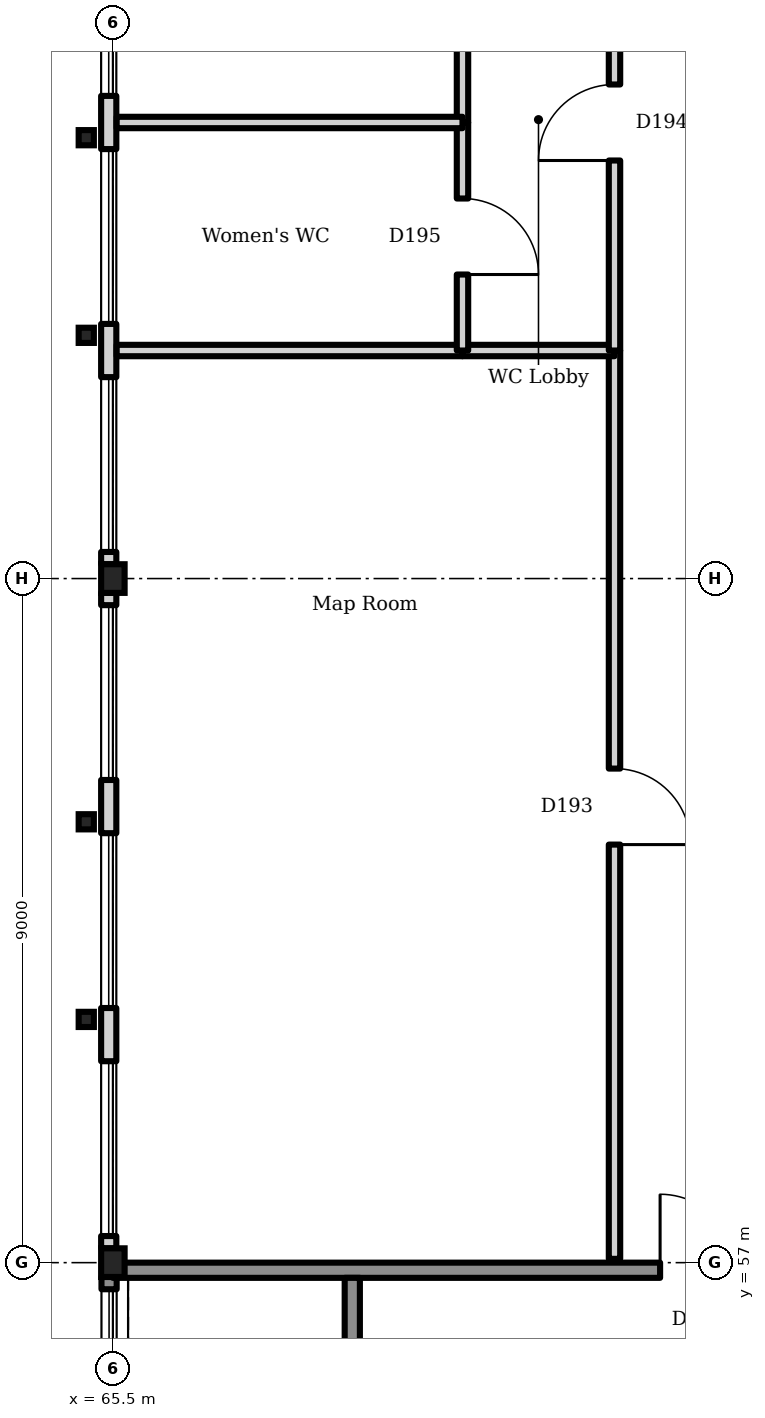
"""IFC4 building model, lengths in metres.
Left out: names, types, materials, properties, quantities, classifications, styles, units other than length and angle.
Written with IfcOpenShell. Run it as: python <this file> out.ifc"""

import sys

from ifc_helpers import new_model, si_unit, direction, frame, frame_2d, origin, origin_2d, place, context, subcontext, project, spatial, rectangle, hollow_rectangle, i_section, extrude, element, fill, save


model = new_model("IFC4")
c1 = context("Model", 3, precision=1e-05, world=origin(), true_north=direction((0.0, 1.0)))
c2 = subcontext(c1, "Body", "Model", "MODEL_VIEW")
j1 = project(units=[si_unit("LENGTHUNIT", "METRE"), si_unit("PLANEANGLEUNIT", "RADIAN")], contexts=[c1])
p1 = place(None, origin())
s1 = spatial("IfcSite", under=j1, at=p1, CompositionType="ELEMENT")
p2 = place(p1, origin())
s2 = spatial("IfcBuilding", under=s1, at=p2, CompositionType="ELEMENT")
p3 = place(p2, frame((0.0, 0.0, 5.4)))
s3 = spatial("IfcBuildingStorey", under=s2, at=p3, CompositionType="ELEMENT", Elevation=5.4)
for number, where, z_axis, x_axis in (
    (1, (65.5, 57.0, 0.0), (0.0, 0.0, 1.0), (1.0, 0.0, 0.0)),
    (2, (65.5, 66.0, 0.0), (0.0, 0.0, 1.0), (1.0, 0.0, 0.0)),
):
    element("IfcColumn", number, at=place(p3, frame(where, z_axis=z_axis, x_axis=x_axis)), inside=s3, PredefinedType="COLUMN", context=c2, shape_type="SweptSolid", body=[
        extrude(i_section(OverallWidth=0.309, OverallDepth=0.377, WebThickness=0.021, FlangeThickness=0.04, FilletRadius=0.027, at=origin_2d()), origin(), (0.0, 0.0, 1.0), 4.5),
    ])
p4 = place(p3, frame((65.45, 48.32, 0.0), z_axis=(0.0, 0.0, 1.0), x_axis=(0.0, 1.0, 0.0)))
e3 = element("IfcWall", 3, at=p4, inside=s3, PredefinedType="SOLIDWALL", context=c2, shape_type="SweptSolid", body=[
    extrude(rectangle(XDim=8.491, YDim=0.2, at=frame_2d((4.246, 0.0))), origin(), (0.0, 0.0, 1.0), 4.25),
])
p5 = place(p4, frame((3.03, 0.0, 0.9)))
e4 = element("IfcOpeningElement", 4, at=p5, cuts=e3, PredefinedType="OPENING", context=c2, shape_type="SweptSolid", body=[
    extrude(rectangle(XDim=2.3, YDim=2.7, at=frame_2d((1.15, 1.35))), frame((0.0, 0.11, 0.0), z_axis=(0.0, -1.0, 0.0), x_axis=(1.0, 0.0, 0.0)), (0.0, 0.0, 1.0), 0.22),
])
p6 = place(p4, frame((6.03, 0.0, 0.9)))
e5 = element("IfcOpeningElement", 5, at=p6, cuts=e3, PredefinedType="OPENING", context=c2, shape_type="SweptSolid", body=[
    extrude(rectangle(XDim=2.3, YDim=2.7, at=frame_2d((1.15, 1.35))), frame((0.0, 0.11, 0.0), z_axis=(0.0, -1.0, 0.0), x_axis=(1.0, 0.0, 0.0)), (0.0, 0.0, 1.0), 0.22),
])
p7 = place(p3, frame((65.446, 57.188, 0.0), z_axis=(0.0, 0.0, 1.0), x_axis=(0.0, 1.0, 0.0)))
e6 = element("IfcWall", 6, at=p7, inside=s3, PredefinedType="SOLIDWALL", context=c2, shape_type="SweptSolid", body=[
    extrude(rectangle(XDim=8.623, YDim=0.2, at=frame_2d((4.312, 0.0))), origin(), (0.0, 0.0, 1.0), 3.75),
])
p8 = place(p7, frame((0.162, 0.0, 0.9)))
e7 = element("IfcOpeningElement", 7, at=p8, cuts=e6, PredefinedType="OPENING", context=c2, shape_type="SweptSolid", body=[
    extrude(rectangle(XDim=2.3, YDim=2.7, at=frame_2d((1.15, 1.35))), frame((0.0, 0.11, 0.0), z_axis=(0.0, -1.0, 0.0), x_axis=(1.0, 0.0, 0.0)), (0.0, 0.0, 1.0), 0.22),
])
p9 = place(p7, frame((3.162, 0.0, 0.9)))
e8 = element("IfcOpeningElement", 8, at=p9, cuts=e6, PredefinedType="OPENING", context=c2, shape_type="SweptSolid", body=[
    extrude(rectangle(XDim=2.3, YDim=2.7, at=frame_2d((1.15, 1.35))), frame((0.0, 0.11, 0.0), z_axis=(0.0, -1.0, 0.0), x_axis=(1.0, 0.0, 0.0)), (0.0, 0.0, 1.0), 0.22),
])
p10 = place(p7, frame((6.162, 0.0, 0.9)))
e9 = element("IfcOpeningElement", 9, at=p10, cuts=e6, PredefinedType="OPENING", context=c2, shape_type="SweptSolid", body=[
    extrude(rectangle(XDim=2.3, YDim=2.7, at=frame_2d((1.15, 1.35))), frame((0.0, 0.11, 0.0), z_axis=(0.0, -1.0, 0.0), x_axis=(1.0, 0.0, 0.0)), (0.0, 0.0, 1.0), 0.22),
])
p11 = place(p3, frame((65.446, 66.188, 0.0), z_axis=(0.0, 0.0, 1.0), x_axis=(0.0, 1.0, 0.0)))
e10 = element("IfcWall", 10, at=p11, inside=s3, PredefinedType="SOLIDWALL", context=c2, shape_type="SweptSolid", body=[
    extrude(rectangle(XDim=8.595, YDim=0.2, at=frame_2d((4.298, 0.0))), origin(), (0.0, 0.0, 1.0), 3.75),
])
p12 = place(p11, frame((0.162, 0.0, 0.9)))
e11 = element("IfcOpeningElement", 11, at=p12, cuts=e10, PredefinedType="OPENING", context=c2, shape_type="SweptSolid", body=[
    extrude(rectangle(XDim=2.3, YDim=2.7, at=frame_2d((1.15, 1.35))), frame((0.0, 0.11, 0.0), z_axis=(0.0, -1.0, 0.0), x_axis=(1.0, 0.0, 0.0)), (0.0, 0.0, 1.0), 0.22),
])
p13 = place(p11, frame((3.162, 0.0, 0.9)))
e12 = element("IfcOpeningElement", 12, at=p13, cuts=e10, PredefinedType="OPENING", context=c2, shape_type="SweptSolid", body=[
    extrude(rectangle(XDim=2.3, YDim=2.7, at=frame_2d((1.15, 1.35))), frame((0.0, 0.11, 0.0), z_axis=(0.0, -1.0, 0.0), x_axis=(1.0, 0.0, 0.0)), (0.0, 0.0, 1.0), 0.22),
])
p14 = place(p11, frame((6.162, 0.0, 0.9)))
e13 = element("IfcOpeningElement", 13, at=p14, cuts=e10, PredefinedType="OPENING", context=c2, shape_type="SweptSolid", body=[
    extrude(rectangle(XDim=2.3, YDim=2.7, at=frame_2d((1.15, 1.35))), frame((0.0, 0.11, 0.0), z_axis=(0.0, -1.0, 0.0), x_axis=(1.0, 0.0, 0.0)), (0.0, 0.0, 1.0), 0.22),
])
p15 = place(p3, frame((65.5, 56.9, 0.0), z_axis=(0.0, 0.0, 1.0), x_axis=(1.0, 0.0, 0.0)))
e14 = element("IfcWall", 14, at=p15, inside=s3, PredefinedType="SHEAR", context=c2, shape_type="SweptSolid", body=[
    extrude(rectangle(XDim=9.0, YDim=0.2, at=frame_2d((4.5, 0.0))), origin(), (0.0, 0.0, 1.0), 4.25),
])
p16 = place(p15, frame((7.2, 0.0, 0.0)))
e15 = element("IfcOpeningElement", 15, at=p16, cuts=e14, PredefinedType="OPENING", context=c2, shape_type="SweptSolid", body=[
    extrude(rectangle(XDim=1.0, YDim=2.1, at=frame_2d((0.5, 1.05))), frame((0.0, 0.11, 0.0), z_axis=(0.0, -1.0, 0.0), x_axis=(1.0, 0.0, 0.0)), (0.0, 0.0, 1.0), 0.22),
])
p17 = place(p3, frame((68.65, 48.15, 0.0), z_axis=(0.0, 0.0, 1.0), x_axis=(0.0, 1.0, 0.0)))
e16 = element("IfcWall", 16, at=p17, inside=s3, PredefinedType="SHEAR", context=c2, shape_type="SweptSolid", body=[
    extrude(rectangle(XDim=8.65, YDim=0.2, at=frame_2d((4.325, 0.0))), origin(), (0.0, 0.0, 1.0), 4.25),
])
p18 = place(p17, frame((0.35, 0.0, 0.0)))
e17 = element("IfcOpeningElement", 17, at=p18, cuts=e16, PredefinedType="OPENING", context=c2, shape_type="SweptSolid", body=[
    extrude(rectangle(XDim=1.0, YDim=2.1, at=frame_2d((0.5, 1.05))), frame((0.0, 0.11, 0.0), z_axis=(0.0, -1.0, 0.0), x_axis=(1.0, 0.0, 0.0)), (0.0, 0.0, 1.0), 0.22),
])
p19 = place(p3, frame((72.1, 57.05, 0.0), z_axis=(0.0, 0.0, 1.0), x_axis=(0.0, 1.0, 0.0)))
e18 = element("IfcWall", 18, at=p19, inside=s3, PredefinedType="PARTITIONING", context=c2, shape_type="SweptSolid", body=[
    extrude(rectangle(XDim=11.95, YDim=0.15, at=frame_2d((5.975, 0.0))), origin(), (0.0, 0.0, 1.0), 3.7),
])
p20 = place(p19, frame((5.45, 0.0, 0.0)))
e19 = element("IfcOpeningElement", 19, at=p20, cuts=e18, PredefinedType="OPENING", context=c2, shape_type="SweptSolid", body=[
    extrude(rectangle(XDim=1.0, YDim=2.1, at=frame_2d((0.5, 1.05))), frame((0.0, 0.085, 0.0), z_axis=(0.0, -1.0, 0.0), x_axis=(1.0, 0.0, 0.0)), (0.0, 0.0, 1.0), 0.17),
])
p21 = place(p3, frame((70.1, 69.0, 0.0), z_axis=(0.0, 0.0, 1.0), x_axis=(1.0, 0.0, 0.0)))
e20 = element("IfcWall", 20, at=p21, inside=s3, PredefinedType="PARTITIONING", context=c2, shape_type="SweptSolid", body=[
    extrude(rectangle(XDim=2.0, YDim=0.15, at=frame_2d((1.0, 0.0))), origin(), (0.0, 0.0, 1.0), 3.7),
])
p22 = place(p3, frame((65.55, 69.0, 0.0), z_axis=(0.0, 0.0, 1.0), x_axis=(1.0, 0.0, 0.0)))
e21 = element("IfcWall", 21, at=p22, inside=s3, PredefinedType="PARTITIONING", context=c2, shape_type="SweptSolid", body=[
    extrude(rectangle(XDim=4.55, YDim=0.15, at=frame_2d((2.275, 0.0))), origin(), (0.0, 0.0, 1.0), 3.7),
])
p23 = place(p3, frame((72.1, 69.0, 0.0), z_axis=(0.0, 0.0, 1.0), x_axis=(0.0, 1.0, 0.0)))
e22 = element("IfcWall", 22, at=p23, inside=s3, PredefinedType="PARTITIONING", context=c2, shape_type="SweptSolid", body=[
    extrude(rectangle(XDim=5.95, YDim=0.15, at=frame_2d((2.975, 0.0))), origin(), (0.0, 0.0, 1.0), 3.7),
])
p24 = place(p23, frame((2.5, 0.0, 0.0)))
e23 = element("IfcOpeningElement", 23, at=p24, cuts=e22, PredefinedType="OPENING", context=c2, shape_type="SweptSolid", body=[
    extrude(rectangle(XDim=1.0, YDim=2.1, at=frame_2d((0.5, 1.05))), frame((0.0, 0.085, 0.0), z_axis=(0.0, -1.0, 0.0), x_axis=(1.0, 0.0, 0.0)), (0.0, 0.0, 1.0), 0.17),
])
p25 = place(p3, frame((70.1, 72.0, 0.0), z_axis=(0.0, 0.0, 1.0), x_axis=(0.0, 1.0, 0.0)))
e24 = element("IfcWall", 24, at=p25, inside=s3, PredefinedType="PARTITIONING", context=c2, shape_type="SweptSolid", body=[
    extrude(rectangle(XDim=2.95, YDim=0.15, at=frame_2d((1.475, 0.0))), origin(), (0.0, 0.0, 1.0), 3.7),
])
p26 = place(p25, frame((1.0, 0.0, 0.0)))
e25 = element("IfcOpeningElement", 25, at=p26, cuts=e24, PredefinedType="OPENING", context=c2, shape_type="SweptSolid", body=[
    extrude(rectangle(XDim=1.0, YDim=2.1, at=frame_2d((0.5, 1.05))), frame((0.0, 0.085, 0.0), z_axis=(0.0, -1.0, 0.0), x_axis=(1.0, 0.0, 0.0)), (0.0, 0.0, 1.0), 0.17),
])
p27 = place(p3, frame((70.1, 69.0, 0.0), z_axis=(0.0, 0.0, 1.0), x_axis=(0.0, 1.0, 0.0)))
e26 = element("IfcWall", 26, at=p27, inside=s3, PredefinedType="PARTITIONING", context=c2, shape_type="SweptSolid", body=[
    extrude(rectangle(XDim=3.0, YDim=0.15, at=frame_2d((1.5, 0.0))), origin(), (0.0, 0.0, 1.0), 3.7),
])
p28 = place(p27, frame((1.0, 0.0, 0.0)))
e27 = element("IfcOpeningElement", 27, at=p28, cuts=e26, PredefinedType="OPENING", context=c2, shape_type="SweptSolid", body=[
    extrude(rectangle(XDim=1.0, YDim=2.1, at=frame_2d((0.5, 1.05))), frame((0.0, 0.085, 0.0), z_axis=(0.0, -1.0, 0.0), x_axis=(1.0, 0.0, 0.0)), (0.0, 0.0, 1.0), 0.17),
])
p29 = place(p3, frame((65.55, 72.0, 0.0), z_axis=(0.0, 0.0, 1.0), x_axis=(1.0, 0.0, 0.0)))
e28 = element("IfcWall", 28, at=p29, inside=s3, PredefinedType="PARTITIONING", context=c2, shape_type="SweptSolid", body=[
    extrude(rectangle(XDim=4.55, YDim=0.15, at=frame_2d((2.275, 0.0))), origin(), (0.0, 0.0, 1.0), 3.7),
])
for number, where, z_axis, x_axis in (
    (29, (65.15, 60.2, 0.0), (0.0, 0.0, 1.0), (1.0, 0.0, 0.0)),
    (30, (65.15, 62.8, 0.0), (0.0, 0.0, 1.0), (1.0, 0.0, 0.0)),
    (31, (65.15, 69.2, 0.0), (0.0, 0.0, 1.0), (1.0, 0.0, 0.0)),
    (32, (65.15, 71.8, 0.0), (0.0, 0.0, 1.0), (1.0, 0.0, 0.0)),
):
    element("IfcColumn", number, at=place(p3, frame(where, z_axis=z_axis, x_axis=x_axis)), inside=s3, PredefinedType="COLUMN", context=c2, shape_type="SweptSolid", body=[
        extrude(hollow_rectangle(XDim=0.2, YDim=0.2, WallThickness=0.01, InnerFilletRadius=0.01, OuterFilletRadius=0.015, at=origin_2d()), origin(), (0.0, 0.0, 1.0), 4.5),
    ])
p30 = place(p6, origin())
e33 = element("IfcWindow", 33, at=p30, inside=s3, PartitioningType="SINGLE_PANEL", PredefinedType="WINDOW", context=c2, shape_type="SweptSolid", body=[
    extrude(rectangle(XDim=2.3, YDim=2.7, at=frame_2d((1.15, 1.35))), frame((0.0, 0.03, 0.0), z_axis=(0.0, -1.0, 0.0), x_axis=(1.0, 0.0, 0.0)), (0.0, 0.0, 1.0), 0.06),
])
fill(e5, e33)
p31 = place(p8, origin())
e34 = element("IfcWindow", 34, at=p31, inside=s3, PartitioningType="SINGLE_PANEL", PredefinedType="WINDOW", context=c2, shape_type="SweptSolid", body=[
    extrude(rectangle(XDim=2.3, YDim=2.7, at=frame_2d((1.15, 1.35))), frame((0.0, 0.03, 0.0), z_axis=(0.0, -1.0, 0.0), x_axis=(1.0, 0.0, 0.0)), (0.0, 0.0, 1.0), 0.06),
])
fill(e7, e34)
p32 = place(p9, origin())
e35 = element("IfcWindow", 35, at=p32, inside=s3, PartitioningType="SINGLE_PANEL", PredefinedType="WINDOW", context=c2, shape_type="SweptSolid", body=[
    extrude(rectangle(XDim=2.3, YDim=2.7, at=frame_2d((1.15, 1.35))), frame((0.0, 0.03, 0.0), z_axis=(0.0, -1.0, 0.0), x_axis=(1.0, 0.0, 0.0)), (0.0, 0.0, 1.0), 0.06),
])
fill(e8, e35)
p33 = place(p10, origin())
e36 = element("IfcWindow", 36, at=p33, inside=s3, PartitioningType="SINGLE_PANEL", PredefinedType="WINDOW", context=c2, shape_type="SweptSolid", body=[
    extrude(rectangle(XDim=2.3, YDim=2.7, at=frame_2d((1.15, 1.35))), frame((0.0, 0.03, 0.0), z_axis=(0.0, -1.0, 0.0), x_axis=(1.0, 0.0, 0.0)), (0.0, 0.0, 1.0), 0.06),
])
fill(e9, e36)
p34 = place(p12, origin())
e37 = element("IfcWindow", 37, at=p34, inside=s3, PartitioningType="SINGLE_PANEL", PredefinedType="WINDOW", context=c2, shape_type="SweptSolid", body=[
    extrude(rectangle(XDim=2.3, YDim=2.7, at=frame_2d((1.15, 1.35))), frame((0.0, 0.03, 0.0), z_axis=(0.0, -1.0, 0.0), x_axis=(1.0, 0.0, 0.0)), (0.0, 0.0, 1.0), 0.06),
])
fill(e11, e37)
p35 = place(p13, origin())
e38 = element("IfcWindow", 38, at=p35, inside=s3, PartitioningType="SINGLE_PANEL", PredefinedType="WINDOW", context=c2, shape_type="SweptSolid", body=[
    extrude(rectangle(XDim=2.3, YDim=2.7, at=frame_2d((1.15, 1.35))), frame((0.0, 0.03, 0.0), z_axis=(0.0, -1.0, 0.0), x_axis=(1.0, 0.0, 0.0)), (0.0, 0.0, 1.0), 0.06),
])
fill(e12, e38)
p36 = place(p14, origin())
e39 = element("IfcWindow", 39, at=p36, inside=s3, PartitioningType="SINGLE_PANEL", PredefinedType="WINDOW", context=c2, shape_type="SweptSolid", body=[
    extrude(rectangle(XDim=2.3, YDim=2.7, at=frame_2d((1.15, 1.35))), frame((0.0, 0.03, 0.0), z_axis=(0.0, -1.0, 0.0), x_axis=(1.0, 0.0, 0.0)), (0.0, 0.0, 1.0), 0.06),
])
fill(e13, e39)
p37 = place(p16, origin())
e40 = element("IfcDoor", 40, at=p37, inside=s3, OperationType="SINGLE_SWING_RIGHT", PredefinedType="DOOR", context=c2, shape_type="SweptSolid", body=[
    extrude(rectangle(XDim=1.0, YDim=2.1, at=frame_2d((0.5, 1.05))), frame((0.0, 0.025, 0.0), z_axis=(0.0, -1.0, 0.0), x_axis=(1.0, 0.0, 0.0)), (0.0, 0.0, 1.0), 0.05),
])
fill(e15, e40)
p38 = place(p20, frame((1.0, 0.0, 0.0), z_axis=(0.0, 0.0, 1.0), x_axis=(-1.0, 0.0, 0.0)))
e41 = element("IfcDoor", 41, at=p38, inside=s3, OperationType="SINGLE_SWING_LEFT", PredefinedType="DOOR", context=c2, shape_type="SweptSolid", body=[
    extrude(rectangle(XDim=1.0, YDim=2.1, at=frame_2d((0.5, 1.05))), frame((0.0, 0.025, 0.0), z_axis=(0.0, -1.0, 0.0), x_axis=(1.0, 0.0, 0.0)), (0.0, 0.0, 1.0), 0.05),
])
fill(e19, e41)
p39 = place(p24, origin())
e42 = element("IfcDoor", 42, at=p39, inside=s3, OperationType="SINGLE_SWING_RIGHT", PredefinedType="DOOR", context=c2, shape_type="SweptSolid", body=[
    extrude(rectangle(XDim=1.0, YDim=2.1, at=frame_2d((0.5, 1.05))), frame((0.0, 0.025, 0.0), z_axis=(0.0, -1.0, 0.0), x_axis=(1.0, 0.0, 0.0)), (0.0, 0.0, 1.0), 0.05),
])
fill(e23, e42)
p40 = place(p28, frame((1.0, 0.0, 0.0), z_axis=(0.0, 0.0, 1.0), x_axis=(-1.0, 0.0, 0.0)))
e43 = element("IfcDoor", 43, at=p40, inside=s3, OperationType="SINGLE_SWING_LEFT", PredefinedType="DOOR", context=c2, shape_type="SweptSolid", body=[
    extrude(rectangle(XDim=1.0, YDim=2.1, at=frame_2d((0.5, 1.05))), frame((0.0, 0.025, 0.0), z_axis=(0.0, -1.0, 0.0), x_axis=(1.0, 0.0, 0.0)), (0.0, 0.0, 1.0), 0.05),
])
fill(e27, e43)
save(model, sys.argv[1])
